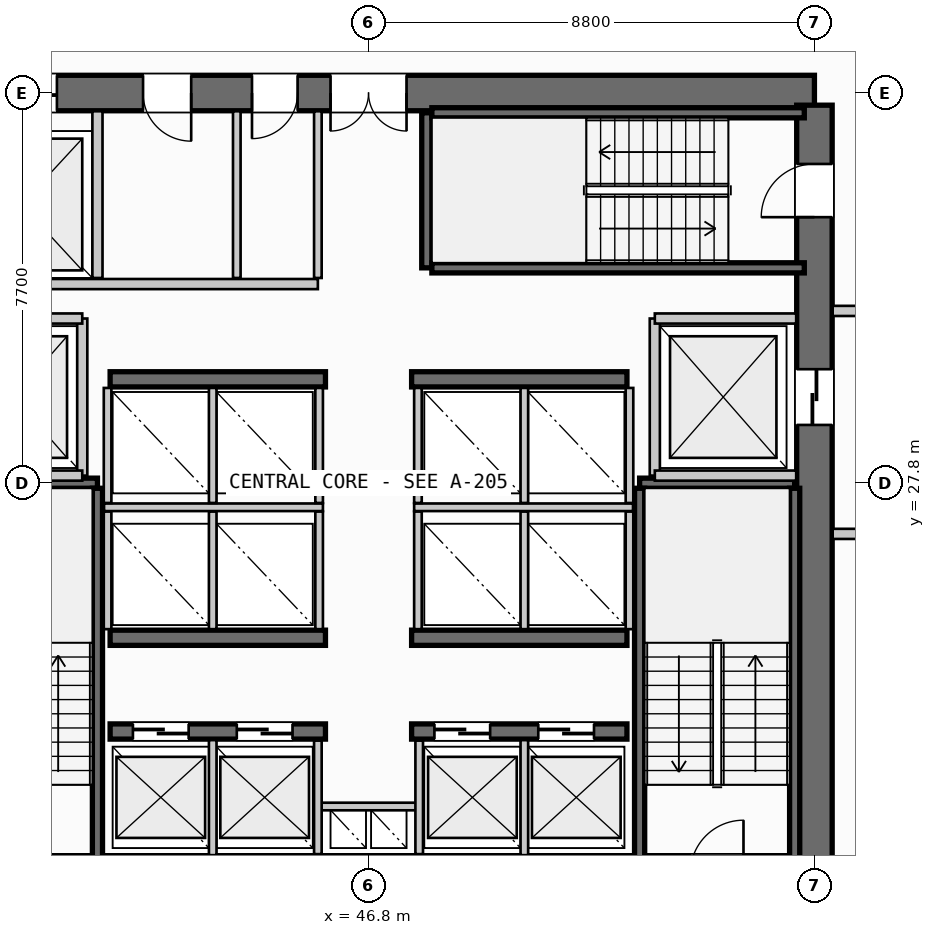
"""IFC4 building model, lengths in metres.
Left out: names, types, materials, properties, quantities, classifications, styles, units other than length and angle.
Written with IfcOpenShell. Run it as: python <this file> out.ifc"""

import sys

from ifc_helpers import new_model, si_unit, direction, frame, frame_2d, origin, place, context, subcontext, project, spatial, rectangle, extrude, source, transform, mapped, element, fill, save


model = new_model("IFC4")
c1 = context("Model", 3, precision=1e-05, world=origin(), true_north=direction((0.0, 1.0)))
c2 = subcontext(c1, "Body", "Model", "MODEL_VIEW")
j1 = project(units=[si_unit("LENGTHUNIT", "METRE"), si_unit("PLANEANGLEUNIT", "RADIAN")], contexts=[c1])
p1 = place(None, origin())
s1 = spatial("IfcSite", under=j1, at=p1, CompositionType="ELEMENT")
p2 = place(p1, origin())
s2 = spatial("IfcBuilding", under=s1, at=p2, CompositionType="ELEMENT")
p3 = place(p2, frame((0.0, 0.0, 33.4)))
s3 = spatial("IfcBuildingStorey", under=s2, at=p3, CompositionType="ELEMENT", Elevation=33.4)
p4 = place(p3, frame((38.0, 20.1, 0.0), z_axis=(0.0, 0.0, 1.0), x_axis=(1.0, 0.0, 0.0)))
e1 = element("IfcWall", 1, at=p4, inside=s3, PredefinedType="SHEAR", context=c2, shape_type="SweptSolid", body=[
    extrude(rectangle(XDim=17.6, YDim=0.7, at=frame_2d((8.8, 0.0))), origin(), (0.0, 0.0, 1.0), 3.55),
])
p5 = place(p4, frame((1.4, 0.0, 0.0)))
e2 = element("IfcOpeningElement", 2, at=p5, cuts=e1, PredefinedType="OPENING", context=c2, shape_type="SweptSolid", body=[
    extrude(rectangle(XDim=1.05, YDim=2.15, at=frame_2d((0.525, 1.075))), frame((0.0, 0.36, 0.0), z_axis=(0.0, -1.0, 0.0), x_axis=(1.0, 0.0, 0.0)), (0.0, 0.0, 1.0), 0.72),
])
p6 = place(p4, frame((15.15, 0.0, 0.0)))
e3 = element("IfcOpeningElement", 3, at=p6, cuts=e1, PredefinedType="OPENING", context=c2, shape_type="SweptSolid", body=[
    extrude(rectangle(XDim=1.05, YDim=2.15, at=frame_2d((0.525, 1.075))), frame((0.0, 0.36, 0.0), z_axis=(0.0, -1.0, 0.0), x_axis=(1.0, 0.0, 0.0)), (0.0, 0.0, 1.0), 0.72),
])
p7 = place(p3, frame((55.6, 35.5, 0.0), z_axis=(0.0, 0.0, 1.0), x_axis=(-1.0, 0.0, 0.0)))
e4 = element("IfcWall", 4, at=p7, inside=s3, PredefinedType="SHEAR", context=c2, shape_type="SweptSolid", body=[
    extrude(rectangle(XDim=17.6, YDim=0.7, at=frame_2d((8.8, 0.0))), origin(), (0.0, 0.0, 1.0), 3.55),
])
p8 = place(p7, frame((8.05, 0.0, 0.0)))
e5 = element("IfcOpeningElement", 5, at=p8, cuts=e4, PredefinedType="OPENING", context=c2, shape_type="SweptSolid", body=[
    extrude(rectangle(XDim=1.5, YDim=2.2, at=frame_2d((0.75, 1.1))), frame((0.0, 0.36, 0.0), z_axis=(0.0, -1.0, 0.0), x_axis=(1.0, 0.0, 0.0)), (0.0, 0.0, 1.0), 0.72),
])
p9 = place(p7, frame((14.95, 0.0, 0.0)))
e6 = element("IfcOpeningElement", 6, at=p9, cuts=e4, PredefinedType="OPENING", context=c2, shape_type="SweptSolid", body=[
    extrude(rectangle(XDim=1.4, YDim=2.3, at=frame_2d((0.7, 1.15))), frame((0.0, 0.36, 0.0), z_axis=(0.0, -1.0, 0.0), x_axis=(1.0, 0.0, 0.0)), (0.0, 0.0, 1.0), 0.72),
])
p10 = place(p7, frame((12.3, 0.0, 0.0)))
e7 = element("IfcOpeningElement", 7, at=p10, cuts=e4, PredefinedType="OPENING", context=c2, shape_type="SweptSolid", body=[
    extrude(rectangle(XDim=0.95, YDim=2.15, at=frame_2d((0.475, 1.075))), frame((0.0, 0.36, 0.0), z_axis=(0.0, -1.0, 0.0), x_axis=(1.0, 0.0, 0.0)), (0.0, 0.0, 1.0), 0.72),
])
p11 = place(p7, frame((10.2, 0.0, 0.0)))
e8 = element("IfcOpeningElement", 8, at=p11, cuts=e4, PredefinedType="OPENING", context=c2, shape_type="SweptSolid", body=[
    extrude(rectangle(XDim=0.9, YDim=2.15, at=frame_2d((0.45, 1.075))), frame((0.0, 0.36, 0.0), z_axis=(0.0, -1.0, 0.0), x_axis=(1.0, 0.0, 0.0)), (0.0, 0.0, 1.0), 0.72),
])
p12 = place(p3, frame((55.6, 20.34, 0.0), z_axis=(0.0, 0.0, 1.0), x_axis=(0.0, 1.0, 0.0)))
e9 = element("IfcWall", 9, at=p12, inside=s3, PredefinedType="SHEAR", context=c2, shape_type="SweptSolid", body=[
    extrude(rectangle(XDim=14.92, YDim=0.7, at=frame_2d((7.46, 0.0))), origin(), (0.0, 0.0, 1.0), 3.55),
])
p13 = place(p12, frame((12.71, 0.0, 0.0)))
e10 = element("IfcOpeningElement", 10, at=p13, cuts=e9, PredefinedType="OPENING", context=c2, shape_type="SweptSolid", body=[
    extrude(rectangle(XDim=1.05, YDim=2.15, at=frame_2d((0.525, 1.075))), frame((0.0, 0.36, 0.0), z_axis=(0.0, -1.0, 0.0), x_axis=(1.0, 0.0, 0.0)), (0.0, 0.0, 1.0), 0.72),
])
p14 = place(p12, frame((8.61, 0.0, 0.0)))
e11 = element("IfcOpeningElement", 11, at=p14, cuts=e9, PredefinedType="OPENING", context=c2, shape_type="SweptSolid", body=[
    extrude(rectangle(XDim=1.1, YDim=2.2, at=frame_2d((0.55, 1.1))), frame((0.0, 0.36, 0.0), z_axis=(0.0, -1.0, 0.0), x_axis=(1.0, 0.0, 0.0)), (0.0, 0.0, 1.0), 0.72),
])
p15 = place(p3, frame((41.7, 22.9, 0.0), z_axis=(0.0, 0.0, 1.0), x_axis=(1.0, 0.0, 0.0)))
e12 = element("IfcWall", 12, at=p15, inside=s3, PredefinedType="SHEAR", context=c2, shape_type="SweptSolid", body=[
    extrude(rectangle(XDim=4.25, YDim=0.3, at=frame_2d((2.125, 0.0))), origin(), (0.0, 0.0, 1.0), 3.55),
])
p16 = place(p15, frame((0.45, 0.0, 0.0)))
e13 = element("IfcOpeningElement", 13, at=p16, cuts=e12, PredefinedType="OPENING", context=c2, shape_type="SweptSolid", body=[
    extrude(rectangle(XDim=1.1, YDim=2.2, at=frame_2d((0.55, 1.1))), frame((0.0, 0.16, 0.0), z_axis=(0.0, -1.0, 0.0), x_axis=(1.0, 0.0, 0.0)), (0.0, 0.0, 1.0), 0.32),
])
p17 = place(p15, frame((2.5, 0.0, 0.0)))
e14 = element("IfcOpeningElement", 14, at=p17, cuts=e12, PredefinedType="OPENING", context=c2, shape_type="SweptSolid", body=[
    extrude(rectangle(XDim=1.1, YDim=2.2, at=frame_2d((0.55, 1.1))), frame((0.0, 0.16, 0.0), z_axis=(0.0, -1.0, 0.0), x_axis=(1.0, 0.0, 0.0)), (0.0, 0.0, 1.0), 0.32),
])
p18 = place(p3, frame((47.65, 22.9, 0.0), z_axis=(0.0, 0.0, 1.0), x_axis=(1.0, 0.0, 0.0)))
e15 = element("IfcWall", 15, at=p18, inside=s3, PredefinedType="SHEAR", context=c2, shape_type="SweptSolid", body=[
    extrude(rectangle(XDim=4.25, YDim=0.3, at=frame_2d((2.125, 0.0))), origin(), (0.0, 0.0, 1.0), 3.55),
])
p19 = place(p18, frame((0.45, 0.0, 0.0)))
e16 = element("IfcOpeningElement", 16, at=p19, cuts=e15, PredefinedType="OPENING", context=c2, shape_type="SweptSolid", body=[
    extrude(rectangle(XDim=1.1, YDim=2.2, at=frame_2d((0.55, 1.1))), frame((0.0, 0.16, 0.0), z_axis=(0.0, -1.0, 0.0), x_axis=(1.0, 0.0, 0.0)), (0.0, 0.0, 1.0), 0.32),
])
p20 = place(p18, frame((2.5, 0.0, 0.0)))
e17 = element("IfcOpeningElement", 17, at=p20, cuts=e15, PredefinedType="OPENING", context=c2, shape_type="SweptSolid", body=[
    extrude(rectangle(XDim=1.1, YDim=2.2, at=frame_2d((0.55, 1.1))), frame((0.0, 0.16, 0.0), z_axis=(0.0, -1.0, 0.0), x_axis=(1.0, 0.0, 0.0)), (0.0, 0.0, 1.0), 0.32),
])
for number, where, z_axis, x_axis in (
    (18, (41.7, 24.75, 0.0), (0.0, 0.0, 1.0), (1.0, 0.0, 0.0)),
    (19, (47.65, 24.75, 0.0), (0.0, 0.0, 1.0), (1.0, 0.0, 0.0)),
    (20, (41.7, 29.85, 0.0), (0.0, 0.0, 1.0), (1.0, 0.0, 0.0)),
    (21, (47.65, 29.85, 0.0), (0.0, 0.0, 1.0), (1.0, 0.0, 0.0)),
):
    element("IfcWall", number, at=place(p3, frame(where, z_axis=z_axis, x_axis=x_axis)), inside=s3, PredefinedType="SHEAR", context=c2, shape_type="SweptSolid", body=[
        extrude(rectangle(XDim=4.25, YDim=0.3, at=frame_2d((2.125, 0.0))), origin(), (0.0, 0.0, 1.0), 3.55),
    ])
p21 = place(p3, frame((38.39, 27.8, 0.0), z_axis=(0.0, 0.0, 1.0), x_axis=(1.0, 0.0, 0.0)))
e22 = element("IfcWall", 22, at=p21, inside=s3, PredefinedType="SHEAR", context=c2, shape_type="SweptSolid", body=[
    extrude(rectangle(XDim=3.06, YDim=0.2, at=frame_2d((1.53, 0.0))), origin(), (0.0, 0.0, 1.0), 3.55),
])
p22 = place(p3, frame((41.45, 27.7, 0.0), z_axis=(0.0, 0.0, 1.0), x_axis=(0.0, -1.0, 0.0)))
e23 = element("IfcWall", 23, at=p22, inside=s3, PredefinedType="SHEAR", context=c2, shape_type="SweptSolid", body=[
    extrude(rectangle(XDim=7.35, YDim=0.2, at=frame_2d((3.675, 0.0))), origin(), (0.0, 0.0, 1.0), 3.55),
])
p23 = place(p3, frame((52.15, 27.8, 0.0), z_axis=(0.0, 0.0, 1.0), x_axis=(1.0, 0.0, 0.0)))
e24 = element("IfcWall", 24, at=p23, inside=s3, PredefinedType="SHEAR", context=c2, shape_type="SweptSolid", body=[
    extrude(rectangle(XDim=3.06, YDim=0.2, at=frame_2d((1.53, 0.0))), origin(), (0.0, 0.0, 1.0), 3.55),
])
for number, where, z_axis, x_axis in (
    (25, (55.21, 27.7, 0.0), (0.0, 0.0, 1.0), (0.0, -1.0, 0.0)),
    (26, (52.15, 20.35, 0.0), (0.0, 0.0, 1.0), (0.0, 1.0, 0.0)),
):
    element("IfcWall", number, at=place(p3, frame(where, z_axis=z_axis, x_axis=x_axis)), inside=s3, PredefinedType="SHEAR", context=c2, shape_type="SweptSolid", body=[
        extrude(rectangle(XDim=7.35, YDim=0.2, at=frame_2d((3.675, 0.0))), origin(), (0.0, 0.0, 1.0), 3.55),
    ])
p24 = place(p3, frame((47.95, 32.05, 0.0), z_axis=(0.0, 0.0, 1.0), x_axis=(0.0, 1.0, 0.0)))
e27 = element("IfcWall", 27, at=p24, inside=s3, PredefinedType="SHEAR", context=c2, shape_type="SweptSolid", body=[
    extrude(rectangle(XDim=3.06, YDim=0.2, at=frame_2d((1.53, 0.0))), origin(), (0.0, 0.0, 1.0), 3.55),
])
for number, where, z_axis, x_axis in (
    (28, (48.05, 35.11, 0.0), (0.0, 0.0, 1.0), (1.0, 0.0, 0.0)),
    (29, (55.4, 32.05, 0.0), (0.0, 0.0, 1.0), (-1.0, 0.0, 0.0)),
):
    element("IfcWall", number, at=place(p3, frame(where, z_axis=z_axis, x_axis=x_axis)), inside=s3, PredefinedType="SHEAR", context=c2, shape_type="SweptSolid", body=[
        extrude(rectangle(XDim=7.35, YDim=0.2, at=frame_2d((3.675, 0.0))), origin(), (0.0, 0.0, 1.0), 3.55),
    ])
p25 = place(p3, frame((45.8, 21.42, 0.0), z_axis=(0.0, 0.0, 1.0), x_axis=(1.0, 0.0, 0.0)))
e30 = element("IfcWall", 30, at=p25, inside=s3, PredefinedType="PARTITIONING", context=c2, shape_type="SweptSolid", body=[
    extrude(rectangle(XDim=2.0, YDim=0.15, at=frame_2d((1.0, 0.0))), origin(), (0.0, 0.0, 1.0), 2.925),
])
for number, where, z_axis, x_axis in (
    (31, (45.8, 20.48, 0.0), (0.0, 0.0, 1.0), (0.0, 1.0, 0.0)),
    (32, (47.8, 20.48, 0.0), (0.0, 0.0, 1.0), (0.0, 1.0, 0.0)),
):
    element("IfcWall", number, at=place(p3, frame(where, z_axis=z_axis, x_axis=x_axis)), inside=s3, PredefinedType="PARTITIONING", context=c2, shape_type="SweptSolid", body=[
        extrude(rectangle(XDim=2.24, YDim=0.15, at=frame_2d((1.12, 0.0))), origin(), (0.0, 0.0, 1.0), 2.925),
    ])
p26 = place(p3, frame((41.15, 27.95, 0.0), z_axis=(0.0, 0.0, 1.0), x_axis=(0.0, 1.0, 0.0)))
e33 = element("IfcWall", 33, at=p26, inside=s3, PredefinedType="PARTITIONING", context=c2, shape_type="SweptSolid", body=[
    extrude(rectangle(XDim=3.1, YDim=0.2, at=frame_2d((1.55, 0.0))), origin(), (0.0, 0.0, 1.0), 2.925),
])
for number, where, z_axis, x_axis in (
    (34, (38.36, 27.95, 0.0), (0.0, 0.0, 1.0), (1.0, 0.0, 0.0)),
    (35, (38.36, 31.05, 0.0), (0.0, 0.0, 1.0), (1.0, 0.0, 0.0)),
):
    element("IfcWall", number, at=place(p3, frame(where, z_axis=z_axis, x_axis=x_axis)), inside=s3, PredefinedType="PARTITIONING", context=c2, shape_type="SweptSolid", body=[
        extrude(rectangle(XDim=2.79, YDim=0.2, at=frame_2d((1.395, 0.0))), origin(), (0.0, 0.0, 1.0), 2.925),
    ])
p27 = place(p3, frame((52.45, 27.95, 0.0), z_axis=(0.0, 0.0, 1.0), x_axis=(0.0, 1.0, 0.0)))
e36 = element("IfcWall", 36, at=p27, inside=s3, PredefinedType="PARTITIONING", context=c2, shape_type="SweptSolid", body=[
    extrude(rectangle(XDim=3.1, YDim=0.2, at=frame_2d((1.55, 0.0))), origin(), (0.0, 0.0, 1.0), 2.925),
])
for number, where, z_axis, x_axis in (
    (37, (52.45, 27.95, 0.0), (0.0, 0.0, 1.0), (1.0, 0.0, 0.0)),
    (38, (52.45, 31.05, 0.0), (0.0, 0.0, 1.0), (1.0, 0.0, 0.0)),
):
    element("IfcWall", number, at=place(p3, frame(where, z_axis=z_axis, x_axis=x_axis)), inside=s3, PredefinedType="PARTITIONING", context=c2, shape_type="SweptSolid", body=[
        extrude(rectangle(XDim=2.79, YDim=0.2, at=frame_2d((1.395, 0.0))), origin(), (0.0, 0.0, 1.0), 2.925),
    ])
for number, where, z_axis, x_axis in (
    (39, (55.96, 26.8, 0.0), (0.0, 0.0, 1.0), (1.0, 0.0, 0.0)),
    (40, (55.96, 31.2, 0.0), (0.0, 0.0, 1.0), (1.0, 0.0, 0.0)),
):
    element("IfcWall", number, at=place(p3, frame(where, z_axis=z_axis, x_axis=x_axis)), inside=s3, PredefinedType="PARTITIONING", context=c2, shape_type="SweptSolid", body=[
        extrude(rectangle(XDim=3.14, YDim=0.2, at=frame_2d((1.57, 0.0))), origin(), (0.0, 0.0, 1.0), 2.925),
    ])
for number, where, z_axis, x_axis in (
    (41, (43.725, 20.46, 0.0), (0.0, 0.0, 1.0), (0.0, 1.0, 0.0)),
    (42, (49.875, 20.46, 0.0), (0.0, 0.0, 1.0), (0.0, 1.0, 0.0)),
):
    element("IfcWall", number, at=place(p3, frame(where, z_axis=z_axis, x_axis=x_axis)), inside=s3, PredefinedType="PARTITIONING", context=c2, shape_type="SweptSolid", body=[
        extrude(rectangle(XDim=2.27, YDim=0.15, at=frame_2d((1.135, 0.0))), origin(), (0.0, 0.0, 1.0), 2.925),
    ])
p28 = place(p3, frame((41.58, 27.325, 0.0), z_axis=(0.0, 0.0, 1.0), x_axis=(1.0, 0.0, 0.0)))
e43 = element("IfcWall", 43, at=p28, inside=s3, PredefinedType="PARTITIONING", context=c2, shape_type="SweptSolid", body=[
    extrude(rectangle(XDim=4.32, YDim=0.15, at=frame_2d((2.16, 0.0))), origin(), (0.0, 0.0, 1.0), 2.925),
])
p29 = place(p3, frame((47.7, 27.325, 0.0), z_axis=(0.0, 0.0, 1.0), x_axis=(1.0, 0.0, 0.0)))
e44 = element("IfcWall", 44, at=p29, inside=s3, PredefinedType="PARTITIONING", context=c2, shape_type="SweptSolid", body=[
    extrude(rectangle(XDim=4.32, YDim=0.15, at=frame_2d((2.16, 0.0))), origin(), (0.0, 0.0, 1.0), 2.925),
])
for number, where, z_axis, x_axis in (
    (45, (41.65, 24.92, 0.0), (0.0, 0.0, 1.0), (0.0, 1.0, 0.0)),
    (46, (43.725, 24.92, 0.0), (0.0, 0.0, 1.0), (0.0, 1.0, 0.0)),
    (47, (45.825, 24.92, 0.0), (0.0, 0.0, 1.0), (0.0, 1.0, 0.0)),
    (48, (47.775, 24.92, 0.0), (0.0, 0.0, 1.0), (0.0, 1.0, 0.0)),
    (49, (49.875, 24.92, 0.0), (0.0, 0.0, 1.0), (0.0, 1.0, 0.0)),
    (50, (51.95, 24.92, 0.0), (0.0, 0.0, 1.0), (0.0, 1.0, 0.0)),
):
    element("IfcWall", number, at=place(p3, frame(where, z_axis=z_axis, x_axis=x_axis)), inside=s3, PredefinedType="PARTITIONING", context=c2, shape_type="SweptSolid", body=[
        extrude(rectangle(XDim=2.32, YDim=0.15, at=frame_2d((1.16, 0.0))), origin(), (0.0, 0.0, 1.0), 2.925),
    ])
for number, where, z_axis, x_axis in (
    (51, (41.65, 27.41, 0.0), (0.0, 0.0, 1.0), (0.0, 1.0, 0.0)),
    (52, (43.725, 27.41, 0.0), (0.0, 0.0, 1.0), (0.0, 1.0, 0.0)),
    (53, (45.825, 27.41, 0.0), (0.0, 0.0, 1.0), (0.0, 1.0, 0.0)),
    (54, (47.775, 27.41, 0.0), (0.0, 0.0, 1.0), (0.0, 1.0, 0.0)),
    (55, (49.875, 27.41, 0.0), (0.0, 0.0, 1.0), (0.0, 1.0, 0.0)),
    (56, (51.95, 27.41, 0.0), (0.0, 0.0, 1.0), (0.0, 1.0, 0.0)),
):
    element("IfcWall", number, at=place(p3, frame(where, z_axis=z_axis, x_axis=x_axis)), inside=s3, PredefinedType="PARTITIONING", context=c2, shape_type="SweptSolid", body=[
        extrude(rectangle(XDim=2.27, YDim=0.15, at=frame_2d((1.135, 0.0))), origin(), (0.0, 0.0, 1.0), 2.925),
    ])
p30 = place(p3, frame((41.45, 31.85, 0.0), z_axis=(0.0, 0.0, 1.0), x_axis=(0.0, 1.0, 0.0)))
e57 = element("IfcWall", 57, at=p30, inside=s3, PredefinedType="PARTITIONING", context=c2, shape_type="SweptSolid", body=[
    extrude(rectangle(XDim=3.29, YDim=0.2, at=frame_2d((1.645, 0.0))), origin(), (0.0, 0.0, 1.0), 2.925),
])
p31 = place(p3, frame((38.36, 31.73, 0.0), z_axis=(0.0, 0.0, 1.0), x_axis=(1.0, 0.0, 0.0)))
e58 = element("IfcWall", 58, at=p31, inside=s3, PredefinedType="PARTITIONING", context=c2, shape_type="SweptSolid", body=[
    extrude(rectangle(XDim=7.44, YDim=0.2, at=frame_2d((3.72, 0.0))), origin(), (0.0, 0.0, 1.0), 2.925),
])
p32 = place(p3, frame((45.8, 31.85, 0.0), z_axis=(0.0, 0.0, 1.0), x_axis=(0.0, 1.0, 0.0)))
e59 = element("IfcWall", 59, at=p32, inside=s3, PredefinedType="PARTITIONING", context=c2, shape_type="SweptSolid", body=[
    extrude(rectangle(XDim=3.29, YDim=0.15, at=frame_2d((1.645, 0.0))), origin(), (0.0, 0.0, 1.0), 2.925),
])
p33 = place(p3, frame((44.2, 31.85, 0.0), z_axis=(0.0, 0.0, 1.0), x_axis=(0.0, 1.0, 0.0)))
e60 = element("IfcWall", 60, at=p33, inside=s3, PredefinedType="PLUMBINGWALL", context=c2, shape_type="SweptSolid", body=[
    extrude(rectangle(XDim=3.29, YDim=0.15, at=frame_2d((1.645, 0.0))), origin(), (0.0, 0.0, 1.0), 2.925),
])
m1 = source(origin(), c2, "Body", "SweptSolid", [
    extrude(rectangle(XDim=1.05, YDim=2.15, at=frame_2d((0.525, 1.075))), frame((0.0, 0.025, 0.0), z_axis=(0.0, -1.0, 0.0), x_axis=(1.0, 0.0, 0.0)), (0.0, 0.0, 1.0), 0.05),
])
p34 = place(p13, origin())
e61 = element("IfcDoor", 61, at=p34, inside=s3, OperationType="SINGLE_SWING_LEFT", PredefinedType="DOOR", context=c2, shape_type="MappedRepresentation", body=[
    mapped(m1, transform((0.0, 0.0, 0.0), scale=1.0)),
])
fill(e10, e61)
m2 = source(origin(), c2, "Body", "SweptSolid", [
    extrude(rectangle(XDim=1.5, YDim=2.2, at=frame_2d((0.75, 1.1))), frame((0.0, 0.025, 0.0), z_axis=(0.0, -1.0, 0.0), x_axis=(1.0, 0.0, 0.0)), (0.0, 0.0, 1.0), 0.05),
])
p35 = place(p8, origin())
e62 = element("IfcDoor", 62, at=p35, inside=s3, OperationType="DOUBLE_DOOR_SINGLE_SWING", PredefinedType="DOOR", context=c2, shape_type="MappedRepresentation", body=[
    mapped(m2, transform((0.0, 0.0, 0.0), scale=1.0)),
])
fill(e5, e62)
m3 = source(origin(), c2, "Body", "SweptSolid", [
    extrude(rectangle(XDim=1.1, YDim=2.2, at=frame_2d((0.55, 1.1))), frame((0.0, 0.025, 0.0), z_axis=(0.0, -1.0, 0.0), x_axis=(1.0, 0.0, 0.0)), (0.0, 0.0, 1.0), 0.05),
])
p36 = place(p14, origin())
e63 = element("IfcDoor", 63, at=p36, inside=s3, OperationType="SLIDING_TO_RIGHT", PredefinedType="DOOR", context=c2, shape_type="MappedRepresentation", body=[
    mapped(m3, transform((0.0, 0.0, 0.0), scale=1.0)),
])
fill(e11, e63)
p37 = place(p16, origin())
e64 = element("IfcDoor", 64, at=p37, inside=s3, OperationType="SLIDING_TO_LEFT", PredefinedType="DOOR", context=c2, shape_type="MappedRepresentation", body=[
    mapped(m3, transform((0.0, 0.0, 0.0), scale=1.0)),
])
fill(e13, e64)
p38 = place(p17, origin())
e65 = element("IfcDoor", 65, at=p38, inside=s3, OperationType="SLIDING_TO_LEFT", PredefinedType="DOOR", context=c2, shape_type="MappedRepresentation", body=[
    mapped(m3, transform((0.0, 0.0, 0.0), scale=1.0)),
])
fill(e14, e65)
p39 = place(p19, origin())
e66 = element("IfcDoor", 66, at=p39, inside=s3, OperationType="SLIDING_TO_LEFT", PredefinedType="DOOR", context=c2, shape_type="MappedRepresentation", body=[
    mapped(m3, transform((0.0, 0.0, 0.0), scale=1.0)),
])
fill(e16, e66)
p40 = place(p20, origin())
e67 = element("IfcDoor", 67, at=p40, inside=s3, OperationType="SLIDING_TO_LEFT", PredefinedType="DOOR", context=c2, shape_type="MappedRepresentation", body=[
    mapped(m3, transform((0.0, 0.0, 0.0), scale=1.0)),
])
fill(e17, e67)
m4 = source(origin(), c2, "Body", "SweptSolid", [
    extrude(rectangle(XDim=1.4, YDim=2.3, at=frame_2d((0.7, 1.15))), frame((0.0, 0.025, 0.0), z_axis=(0.0, -1.0, 0.0), x_axis=(1.0, 0.0, 0.0)), (0.0, 0.0, 1.0), 0.05),
])
p41 = place(p9, origin())
e68 = element("IfcDoor", 68, at=p41, inside=s3, OperationType="SLIDING_TO_RIGHT", PredefinedType="DOOR", context=c2, shape_type="MappedRepresentation", body=[
    mapped(m4, transform((0.0, 0.0, 0.0), scale=1.0)),
])
fill(e6, e68)
m5 = source(origin(), c2, "Body", "SweptSolid", [
    extrude(rectangle(XDim=0.95, YDim=2.15, at=frame_2d((0.475, 1.075))), frame((0.0, 0.025, 0.0), z_axis=(0.0, -1.0, 0.0), x_axis=(1.0, 0.0, 0.0)), (0.0, 0.0, 1.0), 0.05),
])
p42 = place(p10, origin())
e69 = element("IfcDoor", 69, at=p42, inside=s3, OperationType="SINGLE_SWING_LEFT", PredefinedType="DOOR", context=c2, shape_type="MappedRepresentation", body=[
    mapped(m5, transform((0.0, 0.0, 0.0), scale=1.0)),
])
fill(e7, e69)
m6 = source(origin(), c2, "Body", "SweptSolid", [
    extrude(rectangle(XDim=0.9, YDim=2.15, at=frame_2d((0.45, 1.075))), frame((0.0, 0.025, 0.0), z_axis=(0.0, -1.0, 0.0), x_axis=(1.0, 0.0, 0.0)), (0.0, 0.0, 1.0), 0.05),
])
p43 = place(p11, origin())
e70 = element("IfcDoor", 70, at=p43, inside=s3, OperationType="SINGLE_SWING_RIGHT", PredefinedType="DOOR", context=c2, shape_type="MappedRepresentation", body=[
    mapped(m6, transform((0.0, 0.0, 0.0), scale=1.0)),
])
fill(e8, e70)
save(model, sys.argv[1])
